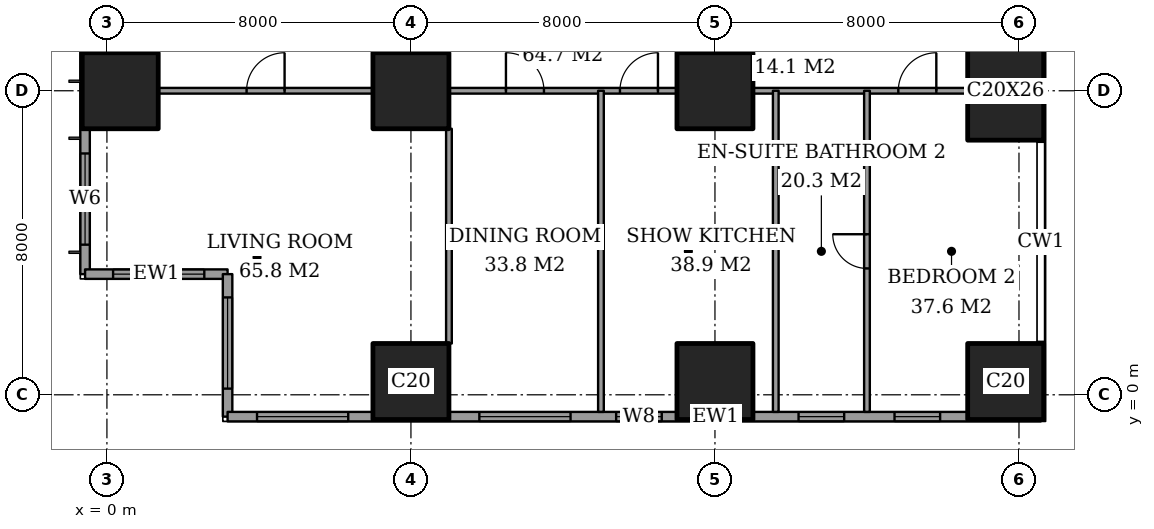
"""IFC4 building model, lengths in metres.
Left out: names, types, materials, properties, quantities, classifications, styles, units other than length and angle.
Written with IfcOpenShell. Run it as: python <this file> out.ifc"""

import sys

from ifc_helpers import new_model, si_unit, direction, frame, frame_2d, origin, origin_2d, place, context, subcontext, project, spatial, rectangle, extrude, element, fill, save


model = new_model("IFC4")
c1 = context("Model", 3, precision=1e-05, world=origin(), true_north=direction((0.0, 1.0)))
c2 = subcontext(c1, "Body", "Model", "MODEL_VIEW")
j1 = project(units=[si_unit("LENGTHUNIT", "METRE"), si_unit("PLANEANGLEUNIT", "RADIAN")], contexts=[c1])
p1 = place(None, origin())
s1 = spatial("IfcSite", under=j1, at=p1, CompositionType="ELEMENT")
p2 = place(p1, origin())
s2 = spatial("IfcBuilding", under=s1, at=p2, CompositionType="ELEMENT")
p3 = place(p2, frame((0.0, 0.0, 44.0)))
s3 = spatial("IfcBuildingStorey", under=s2, at=p3, CompositionType="ELEMENT", Elevation=44.0)
for number, where, z_axis, x_axis in (
    (1, (0.35, 8.0, 0.0), (0.0, 0.0, 1.0), (1.0, 0.0, 0.0)),
    (2, (8.0, 0.35, 0.0), (0.0, 0.0, 1.0), (1.0, 0.0, 0.0)),
    (3, (8.0, 8.0, 0.0), (0.0, 0.0, 1.0), (1.0, 0.0, 0.0)),
    (4, (16.0, 0.35, 0.0), (0.0, 0.0, 1.0), (1.0, 0.0, 0.0)),
    (5, (16.0, 8.0, 0.0), (0.0, 0.0, 1.0), (1.0, 0.0, 0.0)),
    (6, (23.65, 0.35, 0.0), (0.0, 0.0, 1.0), (1.0, 0.0, 0.0)),
):
    element("IfcColumn", number, at=place(p3, frame(where, z_axis=z_axis, x_axis=x_axis)), inside=s3, PredefinedType="COLUMN", context=c2, shape_type="SweptSolid", body=[
        extrude(rectangle(XDim=2.0, YDim=2.0, at=origin_2d()), origin(), (0.0, 0.0, 1.0), 3.6),
    ])
p4 = place(p3, frame((23.65, 8.0, 0.0), z_axis=(0.0, 0.0, 1.0), x_axis=(1.0, 0.0, 0.0)))
e7 = element("IfcColumn", 7, at=p4, inside=s3, PredefinedType="COLUMN", context=c2, shape_type="SweptSolid", body=[
    extrude(rectangle(XDim=2.0, YDim=2.6, at=origin_2d()), origin(), (0.0, 0.0, 1.0), 3.6),
])
p5 = place(p3, frame((-0.575, 44.825, 0.0), z_axis=(0.0, 0.0, 1.0), x_axis=(0.0, -1.0, 0.0)))
e8 = element("IfcWall", 8, at=p5, inside=s3, PredefinedType="SOLIDWALL", context=c2, shape_type="SweptSolid", body=[
    extrude(rectangle(XDim=41.65, YDim=0.25, at=frame_2d((20.825, 0.0))), origin(), (0.0, 0.0, 1.0), 3.6),
])
p6 = place(p5, frame((0.775, 0.0, 0.6)))
e9 = element("IfcOpeningElement", 9, at=p6, cuts=e8, PredefinedType="OPENING", context=c2, shape_type="SweptSolid", body=[
    extrude(rectangle(XDim=2.4, YDim=2.0, at=frame_2d((1.2, 1.0))), frame((0.0, 0.135, 0.0), z_axis=(0.0, -1.0, 0.0), x_axis=(1.0, 0.0, 0.0)), (0.0, 0.0, 1.0), 0.27),
])
p7 = place(p5, frame((6.1, 0.0, 0.6)))
e10 = element("IfcOpeningElement", 10, at=p7, cuts=e8, PredefinedType="OPENING", context=c2, shape_type="SweptSolid", body=[
    extrude(rectangle(XDim=1.2, YDim=2.0, at=frame_2d((0.6, 1.0))), frame((0.0, 0.135, 0.0), z_axis=(0.0, -1.0, 0.0), x_axis=(1.0, 0.0, 0.0)), (0.0, 0.0, 1.0), 0.27),
])
p8 = place(p5, frame((8.425, 0.0, 0.6)))
e11 = element("IfcOpeningElement", 11, at=p8, cuts=e8, PredefinedType="OPENING", context=c2, shape_type="SweptSolid", body=[
    extrude(rectangle(XDim=2.4, YDim=2.0, at=frame_2d((1.2, 1.0))), frame((0.0, 0.135, 0.0), z_axis=(0.0, -1.0, 0.0), x_axis=(1.0, 0.0, 0.0)), (0.0, 0.0, 1.0), 0.27),
])
p9 = place(p5, frame((15.625, 0.0, 0.6)))
e12 = element("IfcOpeningElement", 12, at=p9, cuts=e8, PredefinedType="OPENING", context=c2, shape_type="SweptSolid", body=[
    extrude(rectangle(XDim=2.4, YDim=2.0, at=frame_2d((1.2, 1.0))), frame((0.0, 0.135, 0.0), z_axis=(0.0, -1.0, 0.0), x_axis=(1.0, 0.0, 0.0)), (0.0, 0.0, 1.0), 0.27),
])
p10 = place(p5, frame((23.625, 0.0, 0.6)))
e13 = element("IfcOpeningElement", 13, at=p10, cuts=e8, PredefinedType="OPENING", context=c2, shape_type="SweptSolid", body=[
    extrude(rectangle(XDim=2.4, YDim=2.0, at=frame_2d((1.2, 1.0))), frame((0.0, 0.135, 0.0), z_axis=(0.0, -1.0, 0.0), x_axis=(1.0, 0.0, 0.0)), (0.0, 0.0, 1.0), 0.27),
])
p11 = place(p5, frame((30.825, 0.0, 0.6)))
e14 = element("IfcOpeningElement", 14, at=p11, cuts=e8, PredefinedType="OPENING", context=c2, shape_type="SweptSolid", body=[
    extrude(rectangle(XDim=2.4, YDim=2.0, at=frame_2d((1.2, 1.0))), frame((0.0, 0.135, 0.0), z_axis=(0.0, -1.0, 0.0), x_axis=(1.0, 0.0, 0.0)), (0.0, 0.0, 1.0), 0.27),
])
p12 = place(p5, frame((34.5, 0.0, 0.6)))
e15 = element("IfcOpeningElement", 15, at=p12, cuts=e8, PredefinedType="OPENING", context=c2, shape_type="SweptSolid", body=[
    extrude(rectangle(XDim=1.2, YDim=2.0, at=frame_2d((0.6, 1.0))), frame((0.0, 0.135, 0.0), z_axis=(0.0, -1.0, 0.0), x_axis=(1.0, 0.0, 0.0)), (0.0, 0.0, 1.0), 0.27),
])
p13 = place(p5, frame((38.475, 0.0, 0.6)))
e16 = element("IfcOpeningElement", 16, at=p13, cuts=e8, PredefinedType="OPENING", context=c2, shape_type="SweptSolid", body=[
    extrude(rectangle(XDim=2.4, YDim=2.0, at=frame_2d((1.2, 1.0))), frame((0.0, 0.135, 0.0), z_axis=(0.0, -1.0, 0.0), x_axis=(1.0, 0.0, 0.0)), (0.0, 0.0, 1.0), 0.27),
])
p14 = place(p3, frame((-0.575, 3.175, 0.0), z_axis=(0.0, 0.0, 1.0), x_axis=(1.0, 0.0, 0.0)))
e17 = element("IfcWall", 17, at=p14, inside=s3, PredefinedType="SOLIDWALL", context=c2, shape_type="SweptSolid", body=[
    extrude(rectangle(XDim=3.75, YDim=0.25, at=frame_2d((1.875, 0.0))), origin(), (0.0, 0.0, 1.0), 3.6),
])
p15 = place(p14, frame((0.738, 0.0, 0.6)))
e18 = element("IfcOpeningElement", 18, at=p15, cuts=e17, PredefinedType="OPENING", context=c2, shape_type="SweptSolid", body=[
    extrude(rectangle(XDim=2.4, YDim=2.0, at=frame_2d((1.2, 1.0))), frame((0.0, 0.135, 0.0), z_axis=(0.0, -1.0, 0.0), x_axis=(1.0, 0.0, 0.0)), (0.0, 0.0, 1.0), 0.27),
])
p16 = place(p3, frame((3.175, 3.175, 0.0), z_axis=(0.0, 0.0, 1.0), x_axis=(0.0, -1.0, 0.0)))
e19 = element("IfcWall", 19, at=p16, inside=s3, PredefinedType="SOLIDWALL", context=c2, shape_type="SweptSolid", body=[
    extrude(rectangle(XDim=3.75, YDim=0.25, at=frame_2d((1.875, 0.0))), origin(), (0.0, 0.0, 1.0), 3.6),
])
p17 = place(p16, frame((0.613, 0.0, 0.6)))
e20 = element("IfcOpeningElement", 20, at=p17, cuts=e19, PredefinedType="OPENING", context=c2, shape_type="SweptSolid", body=[
    extrude(rectangle(XDim=2.4, YDim=2.0, at=frame_2d((1.2, 1.0))), frame((0.0, 0.135, 0.0), z_axis=(0.0, -1.0, 0.0), x_axis=(1.0, 0.0, 0.0)), (0.0, 0.0, 1.0), 0.27),
])
p18 = place(p3, frame((3.175, -0.575, 0.0), z_axis=(0.0, 0.0, 1.0), x_axis=(1.0, 0.0, 0.0)))
e21 = element("IfcWall", 21, at=p18, inside=s3, PredefinedType="SOLIDWALL", context=c2, shape_type="SweptSolid", body=[
    extrude(rectangle(XDim=21.4, YDim=0.25, at=frame_2d((10.7, 0.0))), origin(), (0.0, 0.0, 1.0), 3.6),
])
p19 = place(p18, frame((0.775, 0.0, 0.6)))
e22 = element("IfcOpeningElement", 22, at=p19, cuts=e21, PredefinedType="OPENING", context=c2, shape_type="SweptSolid", body=[
    extrude(rectangle(XDim=2.4, YDim=2.0, at=frame_2d((1.2, 1.0))), frame((0.0, 0.135, 0.0), z_axis=(0.0, -1.0, 0.0), x_axis=(1.0, 0.0, 0.0)), (0.0, 0.0, 1.0), 0.27),
])
p20 = place(p18, frame((6.625, 0.0, 0.6)))
e23 = element("IfcOpeningElement", 23, at=p20, cuts=e21, PredefinedType="OPENING", context=c2, shape_type="SweptSolid", body=[
    extrude(rectangle(XDim=2.4, YDim=2.0, at=frame_2d((1.2, 1.0))), frame((0.0, 0.135, 0.0), z_axis=(0.0, -1.0, 0.0), x_axis=(1.0, 0.0, 0.0)), (0.0, 0.0, 1.0), 0.27),
])
p21 = place(p18, frame((10.225, 0.0, 0.6)))
e24 = element("IfcOpeningElement", 24, at=p21, cuts=e21, PredefinedType="OPENING", context=c2, shape_type="SweptSolid", body=[
    extrude(rectangle(XDim=1.2, YDim=2.0, at=frame_2d((0.6, 1.0))), frame((0.0, 0.135, 0.0), z_axis=(0.0, -1.0, 0.0), x_axis=(1.0, 0.0, 0.0)), (0.0, 0.0, 1.0), 0.27),
])
p22 = place(p18, frame((15.025, 0.0, 0.6)))
e25 = element("IfcOpeningElement", 25, at=p22, cuts=e21, PredefinedType="OPENING", context=c2, shape_type="SweptSolid", body=[
    extrude(rectangle(XDim=1.2, YDim=2.0, at=frame_2d((0.6, 1.0))), frame((0.0, 0.135, 0.0), z_axis=(0.0, -1.0, 0.0), x_axis=(1.0, 0.0, 0.0)), (0.0, 0.0, 1.0), 0.27),
])
p23 = place(p18, frame((17.55, 0.0, 0.6)))
e26 = element("IfcOpeningElement", 26, at=p23, cuts=e21, PredefinedType="OPENING", context=c2, shape_type="SweptSolid", body=[
    extrude(rectangle(XDim=1.2, YDim=2.0, at=frame_2d((0.6, 1.0))), frame((0.0, 0.135, 0.0), z_axis=(0.0, -1.0, 0.0), x_axis=(1.0, 0.0, 0.0)), (0.0, 0.0, 1.0), 0.27),
])
p24 = place(p3, frame((1.35, 8.0, 0.0), z_axis=(0.0, 0.0, 1.0), x_axis=(1.0, 0.0, 0.0)))
e27 = element("IfcWall", 27, at=p24, inside=s3, PredefinedType="PARTITIONING", context=c2, shape_type="SweptSolid", body=[
    extrude(rectangle(XDim=5.65, YDim=0.15, at=frame_2d((2.825, 0.0))), origin(), (0.0, 0.0, 1.0), 3.35),
])
p25 = place(p24, frame((2.325, 0.0, 0.0)))
e28 = element("IfcOpeningElement", 28, at=p25, cuts=e27, PredefinedType="OPENING", context=c2, shape_type="SweptSolid", body=[
    extrude(rectangle(XDim=1.0, YDim=2.1, at=frame_2d((0.5, 1.05))), frame((0.0, 0.085, 0.0), z_axis=(0.0, -1.0, 0.0), x_axis=(1.0, 0.0, 0.0)), (0.0, 0.0, 1.0), 0.17),
])
p26 = place(p3, frame((9.0, 8.0, 0.0), z_axis=(0.0, 0.0, 1.0), x_axis=(1.0, 0.0, 0.0)))
e29 = element("IfcWall", 29, at=p26, inside=s3, PredefinedType="PARTITIONING", context=c2, shape_type="SweptSolid", body=[
    extrude(rectangle(XDim=6.0, YDim=0.15, at=frame_2d((3.0, 0.0))), origin(), (0.0, 0.0, 1.0), 3.35),
])
p27 = place(p26, frame((1.5, 0.0, 0.0)))
e30 = element("IfcOpeningElement", 30, at=p27, cuts=e29, PredefinedType="OPENING", context=c2, shape_type="SweptSolid", body=[
    extrude(rectangle(XDim=1.0, YDim=2.1, at=frame_2d((0.5, 1.05))), frame((0.0, 0.085, 0.0), z_axis=(0.0, -1.0, 0.0), x_axis=(1.0, 0.0, 0.0)), (0.0, 0.0, 1.0), 0.17),
])
p28 = place(p26, frame((4.5, 0.0, 0.0)))
e31 = element("IfcOpeningElement", 31, at=p28, cuts=e29, PredefinedType="OPENING", context=c2, shape_type="SweptSolid", body=[
    extrude(rectangle(XDim=1.0, YDim=2.1, at=frame_2d((0.5, 1.05))), frame((0.0, 0.085, 0.0), z_axis=(0.0, -1.0, 0.0), x_axis=(1.0, 0.0, 0.0)), (0.0, 0.0, 1.0), 0.17),
])
p29 = place(p3, frame((17.0, 8.0, 0.0), z_axis=(0.0, 0.0, 1.0), x_axis=(1.0, 0.0, 0.0)))
e32 = element("IfcWall", 32, at=p29, inside=s3, PredefinedType="PARTITIONING", context=c2, shape_type="SweptSolid", body=[
    extrude(rectangle(XDim=5.65, YDim=0.15, at=frame_2d((2.825, 0.0))), origin(), (0.0, 0.0, 1.0), 3.35),
])
p30 = place(p29, frame((3.825, 0.0, 0.0)))
e33 = element("IfcOpeningElement", 33, at=p30, cuts=e32, PredefinedType="OPENING", context=c2, shape_type="SweptSolid", body=[
    extrude(rectangle(XDim=1.0, YDim=2.1, at=frame_2d((0.5, 1.05))), frame((0.0, 0.085, 0.0), z_axis=(0.0, -1.0, 0.0), x_axis=(1.0, 0.0, 0.0)), (0.0, 0.0, 1.0), 0.17),
])
p31 = place(p3, frame((9.0, 1.35, 0.0), z_axis=(0.0, 0.0, 1.0), x_axis=(0.0, 1.0, 0.0)))
e34 = element("IfcWall", 34, at=p31, inside=s3, PredefinedType="PARTITIONING", context=c2, shape_type="SweptSolid", body=[
    extrude(rectangle(XDim=5.65, YDim=0.15, at=frame_2d((2.825, 0.0))), origin(), (0.0, 0.0, 1.0), 3.35),
])
for number, where, z_axis, x_axis in (
    (35, (13.0, -0.45, 0.0), (0.0, 0.0, 1.0), (0.0, 1.0, 0.0)),
    (36, (17.6, -0.45, 0.0), (0.0, 0.0, 1.0), (0.0, 1.0, 0.0)),
):
    element("IfcWall", number, at=place(p3, frame(where, z_axis=z_axis, x_axis=x_axis)), inside=s3, PredefinedType="PARTITIONING", context=c2, shape_type="SweptSolid", body=[
        extrude(rectangle(XDim=8.45, YDim=0.15, at=frame_2d((4.225, 0.0))), origin(), (0.0, 0.0, 1.0), 3.35),
    ])
p32 = place(p3, frame((20.0, -0.45, 0.0), z_axis=(0.0, 0.0, 1.0), x_axis=(0.0, 1.0, 0.0)))
e37 = element("IfcWall", 37, at=p32, inside=s3, PredefinedType="PARTITIONING", context=c2, shape_type="SweptSolid", body=[
    extrude(rectangle(XDim=8.45, YDim=0.15, at=frame_2d((4.225, 0.0))), origin(), (0.0, 0.0, 1.0), 3.35),
])
p33 = place(p32, frame((3.775, 0.0, 0.0)))
e38 = element("IfcOpeningElement", 38, at=p33, cuts=e37, PredefinedType="OPENING", context=c2, shape_type="SweptSolid", body=[
    extrude(rectangle(XDim=0.9, YDim=2.1, at=frame_2d((0.45, 1.05))), frame((0.0, 0.085, 0.0), z_axis=(0.0, -1.0, 0.0), x_axis=(1.0, 0.0, 0.0)), (0.0, 0.0, 1.0), 0.17),
])
p34 = place(p13, origin())
e39 = element("IfcWindow", 39, at=p34, inside=s3, PartitioningType="SINGLE_PANEL", PredefinedType="WINDOW", context=c2, shape_type="SweptSolid", body=[
    extrude(rectangle(XDim=2.4, YDim=2.0, at=frame_2d((1.2, 1.0))), frame((0.0, 0.03, 0.0), z_axis=(0.0, -1.0, 0.0), x_axis=(1.0, 0.0, 0.0)), (0.0, 0.0, 1.0), 0.06),
])
fill(e16, e39)
p35 = place(p15, origin())
e40 = element("IfcWindow", 40, at=p35, inside=s3, PartitioningType="SINGLE_PANEL", PredefinedType="WINDOW", context=c2, shape_type="SweptSolid", body=[
    extrude(rectangle(XDim=2.4, YDim=2.0, at=frame_2d((1.2, 1.0))), frame((0.0, 0.03, 0.0), z_axis=(0.0, -1.0, 0.0), x_axis=(1.0, 0.0, 0.0)), (0.0, 0.0, 1.0), 0.06),
])
fill(e18, e40)
p36 = place(p17, origin())
e41 = element("IfcWindow", 41, at=p36, inside=s3, PartitioningType="SINGLE_PANEL", PredefinedType="WINDOW", context=c2, shape_type="SweptSolid", body=[
    extrude(rectangle(XDim=2.4, YDim=2.0, at=frame_2d((1.2, 1.0))), frame((0.0, 0.03, 0.0), z_axis=(0.0, -1.0, 0.0), x_axis=(1.0, 0.0, 0.0)), (0.0, 0.0, 1.0), 0.06),
])
fill(e20, e41)
p37 = place(p19, origin())
e42 = element("IfcWindow", 42, at=p37, inside=s3, PartitioningType="SINGLE_PANEL", PredefinedType="WINDOW", context=c2, shape_type="SweptSolid", body=[
    extrude(rectangle(XDim=2.4, YDim=2.0, at=frame_2d((1.2, 1.0))), frame((0.0, 0.03, 0.0), z_axis=(0.0, -1.0, 0.0), x_axis=(1.0, 0.0, 0.0)), (0.0, 0.0, 1.0), 0.06),
])
fill(e22, e42)
p38 = place(p20, origin())
e43 = element("IfcWindow", 43, at=p38, inside=s3, PartitioningType="SINGLE_PANEL", PredefinedType="WINDOW", context=c2, shape_type="SweptSolid", body=[
    extrude(rectangle(XDim=2.4, YDim=2.0, at=frame_2d((1.2, 1.0))), frame((0.0, 0.03, 0.0), z_axis=(0.0, -1.0, 0.0), x_axis=(1.0, 0.0, 0.0)), (0.0, 0.0, 1.0), 0.06),
])
fill(e23, e43)
p39 = place(p21, origin())
e44 = element("IfcWindow", 44, at=p39, inside=s3, PartitioningType="SINGLE_PANEL", PredefinedType="WINDOW", context=c2, shape_type="SweptSolid", body=[
    extrude(rectangle(XDim=1.2, YDim=2.0, at=frame_2d((0.6, 1.0))), frame((0.0, 0.03, 0.0), z_axis=(0.0, -1.0, 0.0), x_axis=(1.0, 0.0, 0.0)), (0.0, 0.0, 1.0), 0.06),
])
fill(e24, e44)
p40 = place(p22, origin())
e45 = element("IfcWindow", 45, at=p40, inside=s3, PartitioningType="SINGLE_PANEL", PredefinedType="WINDOW", context=c2, shape_type="SweptSolid", body=[
    extrude(rectangle(XDim=1.2, YDim=2.0, at=frame_2d((0.6, 1.0))), frame((0.0, 0.03, 0.0), z_axis=(0.0, -1.0, 0.0), x_axis=(1.0, 0.0, 0.0)), (0.0, 0.0, 1.0), 0.06),
])
fill(e25, e45)
p41 = place(p23, origin())
e46 = element("IfcWindow", 46, at=p41, inside=s3, PartitioningType="SINGLE_PANEL", PredefinedType="WINDOW", context=c2, shape_type="SweptSolid", body=[
    extrude(rectangle(XDim=1.2, YDim=2.0, at=frame_2d((0.6, 1.0))), frame((0.0, 0.03, 0.0), z_axis=(0.0, -1.0, 0.0), x_axis=(1.0, 0.0, 0.0)), (0.0, 0.0, 1.0), 0.06),
])
fill(e26, e46)
p42 = place(p25, origin())
e47 = element("IfcDoor", 47, at=p42, inside=s3, OperationType="SINGLE_SWING_LEFT", PredefinedType="DOOR", context=c2, shape_type="SweptSolid", body=[
    extrude(rectangle(XDim=1.0, YDim=2.1, at=frame_2d((0.5, 1.05))), frame((0.0, 0.025, 0.0), z_axis=(0.0, -1.0, 0.0), x_axis=(1.0, 0.0, 0.0)), (0.0, 0.0, 1.0), 0.05),
])
fill(e28, e47)
p43 = place(p27, origin())
e48 = element("IfcDoor", 48, at=p43, inside=s3, OperationType="SINGLE_SWING_RIGHT", PredefinedType="DOOR", context=c2, shape_type="SweptSolid", body=[
    extrude(rectangle(XDim=1.0, YDim=2.1, at=frame_2d((0.5, 1.05))), frame((0.0, 0.025, 0.0), z_axis=(0.0, -1.0, 0.0), x_axis=(1.0, 0.0, 0.0)), (0.0, 0.0, 1.0), 0.05),
])
fill(e30, e48)
p44 = place(p28, origin())
e49 = element("IfcDoor", 49, at=p44, inside=s3, OperationType="SINGLE_SWING_LEFT", PredefinedType="DOOR", context=c2, shape_type="SweptSolid", body=[
    extrude(rectangle(XDim=1.0, YDim=2.1, at=frame_2d((0.5, 1.05))), frame((0.0, 0.025, 0.0), z_axis=(0.0, -1.0, 0.0), x_axis=(1.0, 0.0, 0.0)), (0.0, 0.0, 1.0), 0.05),
])
fill(e31, e49)
p45 = place(p33, origin())
e50 = element("IfcDoor", 50, at=p45, inside=s3, OperationType="SINGLE_SWING_LEFT", PredefinedType="DOOR", context=c2, shape_type="SweptSolid", body=[
    extrude(rectangle(XDim=0.9, YDim=2.1, at=frame_2d((0.45, 1.05))), frame((0.0, 0.025, 0.0), z_axis=(0.0, -1.0, 0.0), x_axis=(1.0, 0.0, 0.0)), (0.0, 0.0, 1.0), 0.05),
])
fill(e38, e50)
p46 = place(p30, origin())
e51 = element("IfcDoor", 51, at=p46, inside=s3, OperationType="SINGLE_SWING_LEFT", PredefinedType="DOOR", context=c2, shape_type="SweptSolid", body=[
    extrude(rectangle(XDim=1.0, YDim=2.1, at=frame_2d((0.5, 1.05))), frame((0.0, 0.025, 0.0), z_axis=(0.0, -1.0, 0.0), x_axis=(1.0, 0.0, 0.0)), (0.0, 0.0, 1.0), 0.05),
])
fill(e33, e51)
save(model, sys.argv[1])
